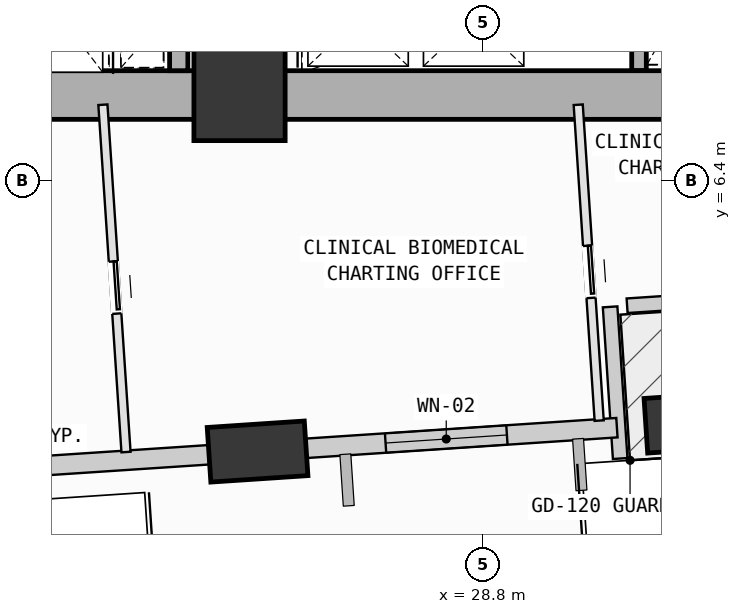
"""IFC4 building model, lengths in metres.
Left out: names, types, materials, properties, quantities, classifications, styles, units other than length and angle.
Written with IfcOpenShell. Run it as: python <this file> out.ifc"""

import sys

from ifc_helpers import new_model, si_unit, direction, frame, frame_2d, origin, origin_2d, place, context, subcontext, project, spatial, rectangle, extrude, element, fill, save


model = new_model("IFC4")
c1 = context("Model", 3, precision=1e-05, world=origin(), true_north=direction((0.0, 1.0)))
c2 = subcontext(c1, "Body", "Model", "MODEL_VIEW")
j1 = project(units=[si_unit("LENGTHUNIT", "METRE"), si_unit("PLANEANGLEUNIT", "RADIAN")], contexts=[c1])
p1 = place(None, origin())
s1 = spatial("IfcSite", under=j1, at=p1, CompositionType="ELEMENT")
p2 = place(p1, origin())
s2 = spatial("IfcBuilding", under=s1, at=p2, CompositionType="ELEMENT")
p3 = place(p2, frame((0.0, 0.0, 39.0)))
s3 = spatial("IfcBuildingStorey", under=s2, at=p3, CompositionType="ELEMENT", Elevation=39.0)
p4 = place(p3, frame((24.8, 7.8, 0.0), z_axis=(0.0, 0.0, 1.0), x_axis=(1.0, 0.0, 0.0)))
e1 = element("IfcColumn", 1, at=p4, inside=s3, PredefinedType="COLUMN", context=c2, shape_type="SweptSolid", body=[
    extrude(rectangle(XDim=1.5, YDim=1.5, at=origin_2d()), origin(), (0.0, 0.0, 1.0), 4.0),
])
p5 = place(p3, frame((25.097, 1.936, 0.002), z_axis=(0.094569811755, -0.034278517886, 0.994927903879), x_axis=(0.278032324808, 0.960548584785, 0.006666530508)))
e2 = element("IfcColumn", 2, at=p5, inside=s3, PredefinedType="COLUMN", context=c2, shape_type="SweptSolid", body=[
    extrude(rectangle(XDim=1.6, YDim=0.9, at=origin_2d()), origin(), (0.0, 0.0, 1.0), 4.017),
])
p6 = place(p3, frame((38.119, 4.795, 0.0), z_axis=(0.0, 0.0, 1.0), x_axis=(-0.997802198498, -0.066262905711, 0.0)))
e3 = element("IfcWall", 3, at=p6, inside=s3, PredefinedType="SOLIDWALL", context=c2, shape_type="SweptSolid", body=[
    extrude(rectangle(XDim=6.96, YDim=0.24, at=frame_2d((3.48, 0.0))), origin(), (0.0, 0.0, 1.0), 3.165),
])
p7 = place(p6, frame((2.93, 0.0, 0.0)))
e4 = element("IfcOpeningElement", 4, at=p7, cuts=e3, PredefinedType="OPENING", context=c2, shape_type="SweptSolid", body=[
    extrude(rectangle(XDim=1.1, YDim=2.15, at=frame_2d((0.55, 1.075))), frame((0.0, 0.13, 0.0), z_axis=(0.0, -1.0, 0.0), x_axis=(1.0, 0.0, 0.0)), (0.0, 0.0, 1.0), 0.26),
])
p8 = place(p3, frame((30.895, 4.316, 0.0), z_axis=(0.0, 0.0, 1.0), x_axis=(0.066311588215, -0.997798964355, 0.0)))
e5 = element("IfcWall", 5, at=p8, inside=s3, PredefinedType="SOLIDWALL", context=c2, shape_type="SweptSolid", body=[
    extrude(rectangle(XDim=2.5, YDim=0.24, at=frame_2d((1.25, 0.0))), origin(), (0.0, 0.0, 1.0), 3.165),
])
p9 = place(p3, frame((24.68, 1.908, 0.0), z_axis=(0.0, 0.0, 1.0), x_axis=(-0.997802391625, -0.066259997488, 0.0)))
e6 = element("IfcWall", 6, at=p9, inside=s3, PredefinedType="SOLIDWALL", context=c2, shape_type="SweptSolid", body=[
    extrude(rectangle(XDim=6.006, YDim=0.32, at=frame_2d((3.003, 0.0))), origin(), (0.0, 0.0, 1.0), 3.165),
])
p10 = place(p9, frame((3.176, 0.0, 0.75)))
e7 = element("IfcOpeningElement", 7, at=p10, cuts=e6, PredefinedType="OPENING", context=c2, shape_type="SweptSolid", body=[
    extrude(rectangle(XDim=1.6, YDim=1.95, at=frame_2d((0.8, 0.975))), frame((0.0, 0.17, 0.0), z_axis=(0.0, -1.0, 0.0), x_axis=(1.0, 0.0, 0.0)), (0.0, 0.0, 1.0), 0.34),
])
p11 = place(p3, frame((31.007, 2.329, 0.0), z_axis=(0.0, 0.0, 1.0), x_axis=(-0.99780174443, -0.066269742805, 0.0)))
e8 = element("IfcWall", 8, at=p11, inside=s3, PredefinedType="SOLIDWALL", context=c2, shape_type="SweptSolid", body=[
    extrude(rectangle(XDim=5.135, YDim=0.32, at=frame_2d((2.568, 0.0))), origin(), (0.0, 0.0, 1.0), 3.165),
])
p12 = place(p11, frame((1.813, 0.0, 0.75)))
e9 = element("IfcOpeningElement", 9, at=p12, cuts=e8, PredefinedType="OPENING", context=c2, shape_type="SweptSolid", body=[
    extrude(rectangle(XDim=2.0, YDim=1.95, at=frame_2d((1.0, 0.975))), frame((0.0, 0.17, 0.0), z_axis=(0.0, -1.0, 0.0), x_axis=(1.0, 0.0, 0.0)), (0.0, 0.0, 1.0), 0.34),
])
p13 = place(p3, frame((31.37, 8.2, 0.0), z_axis=(0.0, 0.0, 1.0), x_axis=(0.0, 1.0, 0.0)))
e10 = element("IfcWall", 10, at=p13, inside=s3, PredefinedType="SOLIDWALL", context=c2, shape_type="SweptSolid", body=[
    extrude(rectangle(XDim=6.92, YDim=0.24, at=frame_2d((3.46, 0.0))), origin(), (0.0, 0.0, 1.0), 3.78),
])
for number, where, z_axis, x_axis in (
    (11, (14.0, 7.8, 0.0), (0.0, 0.0, 1.0), (1.0, 0.0, 0.0)),
    (12, (24.8, 7.8, 0.0), (0.0, 0.0, 1.0), (1.0, 0.0, 0.0)),
):
    element("IfcWall", number, at=place(p3, frame(where, z_axis=z_axis, x_axis=x_axis)), inside=s3, PredefinedType="SHEAR", context=c2, shape_type="SweptSolid", body=[
        extrude(rectangle(XDim=10.8, YDim=0.8, at=frame_2d((5.4, 0.0))), origin(), (0.0, 0.0, 1.0), 3.78),
    ])
p14 = place(p3, frame((23.8, 8.2, 0.0), z_axis=(0.0, 0.0, 1.0), x_axis=(0.0, 1.0, 0.0)))
e13 = element("IfcWall", 13, at=p14, inside=s3, PredefinedType="SOLIDWALL", context=c2, shape_type="SweptSolid", body=[
    extrude(rectangle(XDim=2.48, YDim=0.3, at=frame_2d((1.24, 0.0))), origin(), (0.0, 0.0, 1.0), 3.78),
])
p15 = place(p3, frame((22.553, 7.64, 0.0), z_axis=(0.0, 0.0, 1.0), x_axis=(0.066402954643, -0.997792888136, 0.0)))
e14 = element("IfcWall", 14, at=p15, inside=s3, PredefinedType="PARTITIONING", context=c2, shape_type="SweptSolid", body=[
    extrude(rectangle(XDim=5.725, YDim=0.15, at=frame_2d((2.862, 0.0))), origin(), (0.0, 0.0, 1.0), 3.78),
])
p16 = place(p15, frame((2.583, 0.0, 0.0)))
e15 = element("IfcOpeningElement", 15, at=p16, cuts=e14, PredefinedType="OPENING", context=c2, shape_type="SweptSolid", body=[
    extrude(rectangle(XDim=0.86, YDim=2.06, at=frame_2d((0.43, 1.03))), frame((0.0, 0.085, 0.0), z_axis=(0.0, -1.0, 0.0), x_axis=(1.0, 0.0, 0.0)), (0.0, 0.0, 1.0), 0.17),
])
p17 = place(p3, frame((25.898, 1.759, 0.0), z_axis=(0.0, 0.0, 1.0), x_axis=(-0.997791426009, -0.066424921399, 0.0)))
e16 = element("IfcWall", 16, at=p17, inside=s3, PredefinedType="PARTITIONING", context=c2, shape_type="SweptSolid", body=[
    extrude(rectangle(XDim=1.206, YDim=0.15, at=frame_2d((0.603, 0.0))), origin(), (0.0, 0.0, 1.0), 3.165),
])
p18 = place(p3, frame((30.37, 7.64, 0.0), z_axis=(0.0, 0.0, 1.0), x_axis=(0.066260678422, -0.997802346407, 0.0)))
e17 = element("IfcWall", 17, at=p18, inside=s3, PredefinedType="PARTITIONING", context=c2, shape_type="SweptSolid", body=[
    extrude(rectangle(XDim=5.206, YDim=0.15, at=frame_2d((2.603, 0.0))), origin(), (0.0, 0.0, 1.0), 3.78),
])
p19 = place(p18, frame((2.324, 0.0, 0.0)))
e18 = element("IfcOpeningElement", 18, at=p19, cuts=e17, PredefinedType="OPENING", context=c2, shape_type="SweptSolid", body=[
    extrude(rectangle(XDim=0.86, YDim=2.06, at=frame_2d((0.43, 1.03))), frame((0.0, 0.085, 0.0), z_axis=(0.0, -1.0, 0.0), x_axis=(1.0, 0.0, 0.0)), (0.0, 0.0, 1.0), 0.17),
])
p20 = place(p12, origin())
e19 = element("IfcWindow", 19, at=p20, inside=s3, PartitioningType="SINGLE_PANEL", PredefinedType="WINDOW", context=c2, shape_type="SweptSolid", body=[
    extrude(rectangle(XDim=2.0, YDim=1.95, at=frame_2d((1.0, 0.975))), frame((0.0, 0.03, 0.0), z_axis=(0.0, -1.0, 0.0), x_axis=(1.0, 0.0, 0.0)), (0.0, 0.0, 1.0), 0.06),
])
fill(e9, e19)
p21 = place(p19, origin())
e20 = element("IfcDoor", 20, at=p21, inside=s3, OperationType="SLIDING_TO_LEFT", PredefinedType="DOOR", context=c2, shape_type="SweptSolid", body=[
    extrude(rectangle(XDim=0.86, YDim=2.06, at=frame_2d((0.43, 1.03))), frame((0.0, 0.025, 0.0), z_axis=(0.0, -1.0, 0.0), x_axis=(1.0, 0.0, 0.0)), (0.0, 0.0, 1.0), 0.05),
])
fill(e18, e20)
p22 = place(p16, origin())
e21 = element("IfcDoor", 21, at=p22, inside=s3, OperationType="SLIDING_TO_LEFT", PredefinedType="DOOR", context=c2, shape_type="SweptSolid", body=[
    extrude(rectangle(XDim=0.86, YDim=2.06, at=frame_2d((0.43, 1.03))), frame((0.0, 0.025, 0.0), z_axis=(0.0, -1.0, 0.0), x_axis=(1.0, 0.0, 0.0)), (0.0, 0.0, 1.0), 0.05),
])
fill(e15, e21)
save(model, sys.argv[1])
